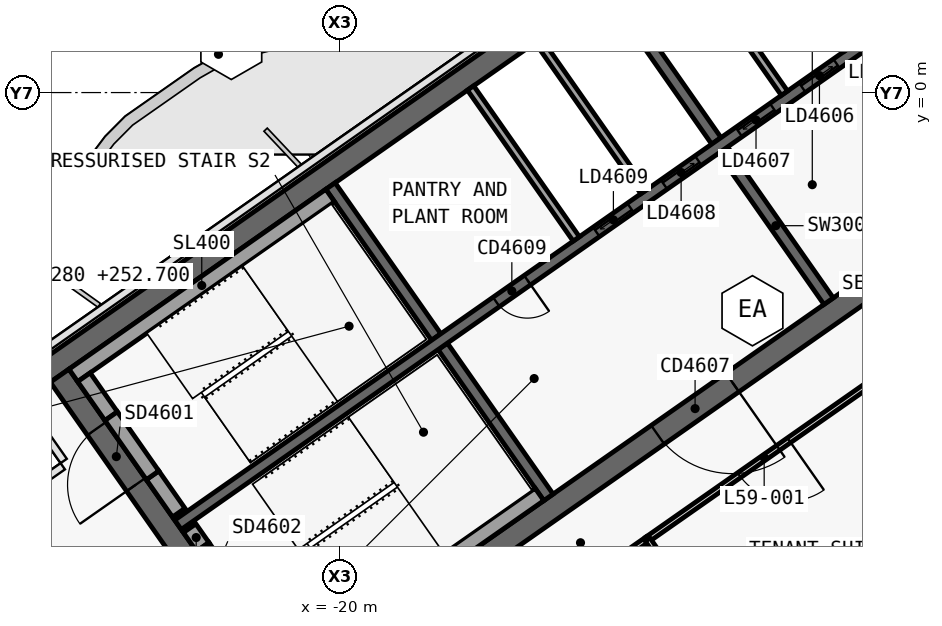
"""IFC4 building model, lengths in metres.
Left out: names, types, materials, properties, quantities, classifications, styles, units other than length and angle.
Written with IfcOpenShell. Run it as: python <this file> out.ifc"""

import sys

from ifc_helpers import new_model, si_unit, direction, frame, frame_2d, origin, place, context, subcontext, project, spatial, polyline, rectangle, outline, extrude, element, fill, save


model = new_model("IFC4")
c1 = context("Model", 3, precision=1e-05, world=origin(), true_north=direction((0.0, 1.0)))
c2 = subcontext(c1, "Body", "Model", "MODEL_VIEW")
j1 = project(units=[si_unit("LENGTHUNIT", "METRE"), si_unit("PLANEANGLEUNIT", "RADIAN")], contexts=[c1])
p1 = place(None, origin())
s1 = spatial("IfcSite", under=j1, at=p1, CompositionType="ELEMENT")
p2 = place(p1, origin())
s2 = spatial("IfcBuilding", under=s1, at=p2, CompositionType="ELEMENT")
p3 = place(p2, frame((0.0, 0.0, 252.7)))
s3 = spatial("IfcBuildingStorey", under=s2, at=p3, CompositionType="ELEMENT", Elevation=252.7)
p4 = place(p3, frame((-0.028, 12.066, 0.0), z_axis=(0.0, 0.0, 1.0), x_axis=(-0.819151382952, -0.573577380837, 0.0)))
e1 = element("IfcWall", 1, at=p4, inside=s3, PredefinedType="SHEAR", context=c2, shape_type="SweptSolid", body=[
    extrude(outline(polyline([(33.898, 0.3), (0.42, 0.3), (0.0, -0.3), (33.898, -0.3), (33.898, 0.3)])), origin(), (0.0, 0.0, 1.0), 3.9),
])
p5 = place(p3, frame((-0.028, -0.874, 0.0), z_axis=(0.0, 0.0, 1.0), x_axis=(-0.819150035022, -0.573579305871, 0.0)))
e2 = element("IfcWall", 2, at=p5, inside=s3, PredefinedType="SHEAR", context=c2, shape_type="SweptSolid", body=[
    extrude(outline(polyline([(26.476, 0.3), (0.42, 0.3), (0.0, -0.3), (26.476, -0.3), (26.476, 0.3)])), origin(), (0.0, 0.0, 1.0), 3.9),
])
p6 = place(p5, frame((2.976, 0.0, 0.0)))
e3 = element("IfcOpeningElement", 3, at=p6, cuts=e2, PredefinedType="OPENING", context=c2, shape_type="SweptSolid", body=[
    extrude(rectangle(XDim=2.4, YDim=2.1, at=frame_2d((1.2, 1.05))), frame((0.0, 0.31, 0.0), z_axis=(0.0, -1.0, 0.0), x_axis=(1.0, 0.0, 0.0)), (0.0, 0.0, 1.0), 0.62),
])
p7 = place(p5, frame((11.776, 0.0, 0.0)))
e4 = element("IfcOpeningElement", 4, at=p7, cuts=e2, PredefinedType="OPENING", context=c2, shape_type="SweptSolid", body=[
    extrude(rectangle(XDim=2.4, YDim=2.1, at=frame_2d((1.2, 1.05))), frame((0.0, 0.31, 0.0), z_axis=(0.0, -1.0, 0.0), x_axis=(1.0, 0.0, 0.0)), (0.0, 0.0, 1.0), 0.62),
])
p8 = place(p3, frame((-21.642, -15.642, 0.0), z_axis=(0.0, 0.0, 1.0), x_axis=(-0.573586866468, 0.819144740944, 0.0)))
e5 = element("IfcWall", 5, at=p8, inside=s3, PredefinedType="SHEAR", context=c2, shape_type="SweptSolid", body=[
    extrude(outline(polyline([(0.0, 0.3), (0.0, -0.3), (10.0, -0.3), (10.0, 0.3), (0.0, 0.3)])), origin(), (0.0, 0.0, 1.0), 3.9),
])
p9 = place(p8, frame((6.5, 0.0, 0.0)))
e6 = element("IfcOpeningElement", 6, at=p9, cuts=e5, PredefinedType="OPENING", context=c2, shape_type="SweptSolid", body=[
    extrude(rectangle(XDim=1.8, YDim=2.1, at=frame_2d((0.9, 1.05))), frame((0.0, 0.31, 0.0), z_axis=(0.0, -1.0, 0.0), x_axis=(1.0, 0.0, 0.0)), (0.0, 0.0, 1.0), 0.62),
])
p10 = place(p8, frame((2.3, 0.0, 0.0)))
e7 = element("IfcOpeningElement", 7, at=p10, cuts=e5, PredefinedType="OPENING", context=c2, shape_type="SweptSolid", body=[
    extrude(rectangle(XDim=1.8, YDim=2.1, at=frame_2d((0.9, 1.05))), frame((0.0, 0.31, 0.0), z_axis=(0.0, -1.0, 0.0), x_axis=(1.0, 0.0, 0.0)), (0.0, 0.0, 1.0), 0.62),
])
p11 = place(p3, frame((-7.143, -5.49, 0.0), z_axis=(0.0, 0.0, 1.0), x_axis=(-0.573617744349, 0.819123118565, 0.0)))
e8 = element("IfcWall", 8, at=p11, inside=s3, PredefinedType="SHEAR", context=c2, shape_type="SweptSolid", body=[
    extrude(outline(polyline([(4.85, 0.15), (0.0, 0.15), (0.0, -0.15), (4.85, -0.15), (4.85, 0.15)])), origin(), (0.0, 0.0, 1.0), 3.9),
])
p12 = place(p3, frame((-10.097, -1.271, 0.0), z_axis=(0.0, 0.0, 1.0), x_axis=(-0.573560315113, 0.819163332265, 0.0)))
e9 = element("IfcWall", 9, at=p12, inside=s3, PredefinedType="SHEAR", context=c2, shape_type="SweptSolid", body=[
    extrude(outline(polyline([(4.85, -0.15), (4.85, 0.15), (0.0, 0.15), (0.0, -0.15), (4.85, -0.15)])), origin(), (0.0, 0.0, 1.0), 3.9),
])
p13 = place(p3, frame((-14.515, -10.652, 0.0), z_axis=(0.0, 0.0, 1.0), x_axis=(-0.573560315113, 0.819163332265, 0.0)))
e10 = element("IfcWall", 10, at=p13, inside=s3, PredefinedType="SHEAR", context=c2, shape_type="SweptSolid", body=[
    extrude(outline(polyline([(4.85, 0.15), (0.0, 0.15), (0.0, -0.15), (4.85, -0.15), (4.85, 0.15)])), origin(), (0.0, 0.0, 1.0), 3.9),
])
p14 = place(p3, frame((-17.469, -6.433, 0.0), z_axis=(0.0, 0.0, 1.0), x_axis=(-0.573594092424, 0.81913968109, 0.0)))
e11 = element("IfcWall", 11, at=p14, inside=s3, PredefinedType="SHEAR", context=c2, shape_type="SweptSolid", body=[
    extrude(outline(polyline([(4.85, -0.15), (4.85, 0.15), (0.0, 0.15), (0.0, -0.15), (4.85, -0.15)])), origin(), (0.0, 0.0, 1.0), 3.9),
])
p15 = place(p3, frame((-2.638, 3.768, 0.0), z_axis=(0.0, 0.0, 1.0), x_axis=(-0.819155014212, -0.573572194837, 0.0)))
e12 = element("IfcWall", 12, at=p15, inside=s3, PredefinedType="SHEAR", context=c2, shape_type="SweptSolid", body=[
    extrude(outline(polyline([(26.4, 0.15), (0.0, 0.15), (0.0, -0.15), (26.4, -0.15), (26.4, 0.15)])), origin(), (0.0, 0.0, 1.0), 3.9),
])
p16 = place(p15, frame((1.169, 0.0, 0.0)))
e13 = element("IfcOpeningElement", 13, at=p16, cuts=e12, PredefinedType="OPENING", context=c2, shape_type="SweptSolid", body=[
    extrude(rectangle(XDim=1.1, YDim=2.1, at=frame_2d((0.55, 1.05))), frame((0.0, 0.16, 0.0), z_axis=(0.0, -1.0, 0.0), x_axis=(1.0, 0.0, 0.0)), (0.0, 0.0, 1.0), 0.32),
])
p17 = place(p15, frame((3.206, 0.0, 0.0)))
e14 = element("IfcOpeningElement", 14, at=p17, cuts=e12, PredefinedType="OPENING", context=c2, shape_type="SweptSolid", body=[
    extrude(rectangle(XDim=1.1, YDim=2.1, at=frame_2d((0.55, 1.05))), frame((0.0, 0.16, 0.0), z_axis=(0.0, -1.0, 0.0), x_axis=(1.0, 0.0, 0.0)), (0.0, 0.0, 1.0), 0.32),
])
p18 = place(p15, frame((5.244, 0.0, 0.0)))
e15 = element("IfcOpeningElement", 15, at=p18, cuts=e12, PredefinedType="OPENING", context=c2, shape_type="SweptSolid", body=[
    extrude(rectangle(XDim=1.1, YDim=2.1, at=frame_2d((0.55, 1.05))), frame((0.0, 0.16, 0.0), z_axis=(0.0, -1.0, 0.0), x_axis=(1.0, 0.0, 0.0)), (0.0, 0.0, 1.0), 0.32),
])
p19 = place(p15, frame((7.281, 0.0, 0.0)))
e16 = element("IfcOpeningElement", 16, at=p19, cuts=e12, PredefinedType="OPENING", context=c2, shape_type="SweptSolid", body=[
    extrude(rectangle(XDim=1.1, YDim=2.1, at=frame_2d((0.55, 1.05))), frame((0.0, 0.16, 0.0), z_axis=(0.0, -1.0, 0.0), x_axis=(1.0, 0.0, 0.0)), (0.0, 0.0, 1.0), 0.32),
])
p20 = place(p15, frame((9.688, 0.0, 0.0)))
e17 = element("IfcOpeningElement", 17, at=p20, cuts=e12, PredefinedType="OPENING", context=c2, shape_type="SweptSolid", body=[
    extrude(rectangle(XDim=1.1, YDim=2.1, at=frame_2d((0.55, 1.05))), frame((0.0, 0.16, 0.0), z_axis=(0.0, -1.0, 0.0), x_axis=(1.0, 0.0, 0.0)), (0.0, 0.0, 1.0), 0.32),
])
p21 = place(p15, frame((11.863, 0.0, 0.0)))
e18 = element("IfcOpeningElement", 18, at=p21, cuts=e12, PredefinedType="OPENING", context=c2, shape_type="SweptSolid", body=[
    extrude(rectangle(XDim=1.1, YDim=2.1, at=frame_2d((0.55, 1.05))), frame((0.0, 0.16, 0.0), z_axis=(0.0, -1.0, 0.0), x_axis=(1.0, 0.0, 0.0)), (0.0, 0.0, 1.0), 0.32),
])
p22 = place(p15, frame((15.175, 0.0, 0.0)))
e19 = element("IfcOpeningElement", 19, at=p22, cuts=e12, PredefinedType="OPENING", context=c2, shape_type="SweptSolid", body=[
    extrude(rectangle(XDim=1.0, YDim=2.1, at=frame_2d((0.5, 1.05))), frame((0.0, 0.16, 0.0), z_axis=(0.0, -1.0, 0.0), x_axis=(1.0, 0.0, 0.0)), (0.0, 0.0, 1.0), 0.32),
])
p23 = place(p3, frame((-8.305, -0.017, 0.0), z_axis=(0.0, 0.0, 1.0), x_axis=(-0.573594092424, 0.81913968109, 0.0)))
e20 = element("IfcWall", 20, at=p23, inside=s3, PredefinedType="SOLIDWALL", context=c2, shape_type="SweptSolid", body=[
    extrude(rectangle(XDim=4.85, YDim=0.2, at=frame_2d((2.425, 0.0))), origin(), (0.0, 0.0, 1.0), 3.9),
])
p24 = place(p3, frame((-12.001, -2.605, 0.0), z_axis=(0.0, 0.0, 1.0), x_axis=(-0.573560315113, 0.819163332265, 0.0)))
e21 = element("IfcWall", 21, at=p24, inside=s3, PredefinedType="SOLIDWALL", context=c2, shape_type="SweptSolid", body=[
    extrude(rectangle(XDim=4.85, YDim=0.2, at=frame_2d((2.425, 0.0))), origin(), (0.0, 0.0, 1.0), 3.9),
])
p25 = place(p3, frame((-13.783, -3.852, 0.0), z_axis=(0.0, 0.0, 1.0), x_axis=(-0.573594092424, 0.81913968109, 0.0)))
e22 = element("IfcWall", 22, at=p25, inside=s3, PredefinedType="SOLIDWALL", context=c2, shape_type="SweptSolid", body=[
    extrude(rectangle(XDim=4.85, YDim=0.2, at=frame_2d((2.425, 0.0))), origin(), (0.0, 0.0, 1.0), 3.9),
])
p26 = place(p3, frame((-20.259, -2.71, 0.0), z_axis=(0.0, 0.0, 1.0), x_axis=(-0.81914849389, -0.573581506813, 0.0)))
e23 = element("IfcWall", 23, at=p26, inside=s3, PredefinedType="SOLIDWALL", context=c2, shape_type="SweptSolid", body=[
    extrude(rectangle(XDim=8.25, YDim=0.4, at=frame_2d((4.125, 0.0))), origin(), (0.0, 0.0, 1.0), 3.62),
])
p27 = place(p3, frame((-24.244, -11.055, 0.0), z_axis=(0.0, 0.0, 1.0), x_axis=(-0.573571582932, 0.819155442668, 0.0)))
e24 = element("IfcWall", 24, at=p27, inside=s3, PredefinedType="SOLIDWALL", context=c2, shape_type="SweptSolid", body=[
    extrude(rectangle(XDim=1.2, YDim=0.4, at=frame_2d((0.6, 0.0))), origin(), (0.0, 0.0, 1.0), 3.62),
])
p28 = place(p3, frame((-26.022, -8.515, 0.0), z_axis=(0.0, 0.0, 1.0), x_axis=(-0.573619628835, 0.819121798889, 0.0)))
e25 = element("IfcWall", 25, at=p28, inside=s3, PredefinedType="SOLIDWALL", context=c2, shape_type="SweptSolid", body=[
    extrude(rectangle(XDim=1.25, YDim=0.4, at=frame_2d((0.625, 0.0))), origin(), (0.0, 0.0, 1.0), 3.62),
])
p29 = place(p3, frame((-24.932, -10.072, 2.15), z_axis=(0.0, 0.0, 1.0), x_axis=(-0.573591692345, 0.819141361715, 0.0)))
e26 = element("IfcWall", 26, at=p29, inside=s3, PredefinedType="SOLIDWALL", context=c2, shape_type="SweptSolid", body=[
    extrude(rectangle(XDim=1.9, YDim=0.4, at=frame_2d((0.95, 0.0))), origin(), (0.0, 0.0, 1.0), 1.47),
])
p30 = place(p3, frame((-14.753, -10.574, 0.0), z_axis=(0.0, 0.0, 1.0), x_axis=(-0.819158229677, -0.573567602601, 0.0)))
e27 = element("IfcWall", 27, at=p30, inside=s3, PredefinedType="SOLIDWALL", context=c2, shape_type="SweptSolid", body=[
    extrude(rectangle(XDim=8.25, YDim=0.4, at=frame_2d((4.125, 0.0))), origin(), (0.0, 0.0, 1.0), 3.62),
])
p31 = place(p3, frame((-23.613, -11.956, 0.0), z_axis=(0.0, 0.0, 1.0), x_axis=(-0.573435029941, 0.819251039936, 0.0)))
e28 = element("IfcWall", 28, at=p31, inside=s3, PredefinedType="SOLIDWALL", context=c2, shape_type="SweptSolid", body=[
    extrude(rectangle(XDim=0.6, YDim=0.4, at=frame_2d((0.3, 0.0))), origin(), (0.0, 0.0, 1.0), 3.62),
])
p32 = place(p3, frame((-22.523, -13.512, 2.15), z_axis=(0.0, 0.0, 1.0), x_axis=(-0.573591692345, 0.819141361715, 0.0)))
e29 = element("IfcWall", 29, at=p32, inside=s3, PredefinedType="SOLIDWALL", context=c2, shape_type="SweptSolid", body=[
    extrude(rectangle(XDim=1.9, YDim=0.4, at=frame_2d((0.95, 0.0))), origin(), (0.0, 0.0, 1.0), 1.47),
])
p33 = place(p3, frame((-5.766, -7.456, 0.0), z_axis=(0.0, 0.0, 1.0), x_axis=(-0.819150881364, -0.573578097177, 0.0)))
e30 = element("IfcWall", 30, at=p33, inside=s3, PredefinedType="PARTITIONING", context=c2, shape_type="SweptSolid", body=[
    extrude(rectangle(XDim=7.502, YDim=0.15, at=frame_2d((3.751, 0.0))), origin(), (0.0, 0.0, 1.0), 3.05),
])
p34 = place(p33, frame((2.951, 0.0, 0.0)))
e31 = element("IfcOpeningElement", 31, at=p34, cuts=e30, PredefinedType="OPENING", context=c2, shape_type="SweptSolid", body=[
    extrude(rectangle(XDim=1.6, YDim=2.1, at=frame_2d((0.8, 1.05))), frame((0.0, 0.085, 0.0), z_axis=(0.0, -1.0, 0.0), x_axis=(1.0, 0.0, 0.0)), (0.0, 0.0, 1.0), 0.17),
])
p35 = place(p3, frame((-11.908, -11.757, 0.0), z_axis=(0.0, 0.0, 1.0), x_axis=(-0.819156568366, -0.573569975245, 0.0)))
e32 = element("IfcWall", 32, at=p35, inside=s3, PredefinedType="PARTITIONING", context=c2, shape_type="SweptSolid", body=[
    extrude(rectangle(XDim=10.504, YDim=0.15, at=frame_2d((5.252, 0.0))), origin(), (0.0, 0.0, 1.0), 3.05),
])
p36 = place(p35, frame((4.452, 0.0, 0.0)))
e33 = element("IfcOpeningElement", 33, at=p36, cuts=e32, PredefinedType="OPENING", context=c2, shape_type="SweptSolid", body=[
    extrude(rectangle(XDim=1.6, YDim=2.1, at=frame_2d((0.8, 1.05))), frame((0.0, 0.085, 0.0), z_axis=(0.0, -1.0, 0.0), x_axis=(1.0, 0.0, 0.0)), (0.0, 0.0, 1.0), 0.17),
])
p37 = place(p3, frame((-7.608, -17.901, 0.0), z_axis=(0.0, 0.0, 1.0), x_axis=(-0.573560650686, 0.819163097304, 0.0)))
e34 = element("IfcWall", 34, at=p37, inside=s3, PredefinedType="PARTITIONING", context=c2, shape_type="SweptSolid", body=[
    extrude(rectangle(XDim=7.5, YDim=0.15, at=frame_2d((3.75, 0.0))), origin(), (0.0, 0.0, 1.0), 3.0),
])
p38 = place(p18, origin())
e35 = element("IfcDoor", 35, at=p38, inside=s3, OperationType="SLIDING_TO_LEFT", PredefinedType="DOOR", context=c2, shape_type="SweptSolid", body=[
    extrude(rectangle(XDim=1.1, YDim=2.1, at=frame_2d((0.55, 1.05))), frame((0.0, 0.025, 0.0), z_axis=(0.0, -1.0, 0.0), x_axis=(1.0, 0.0, 0.0)), (0.0, 0.0, 1.0), 0.05),
])
fill(e15, e35)
p39 = place(p19, origin())
e36 = element("IfcDoor", 36, at=p39, inside=s3, OperationType="SLIDING_TO_RIGHT", PredefinedType="DOOR", context=c2, shape_type="SweptSolid", body=[
    extrude(rectangle(XDim=1.1, YDim=2.1, at=frame_2d((0.55, 1.05))), frame((0.0, 0.025, 0.0), z_axis=(0.0, -1.0, 0.0), x_axis=(1.0, 0.0, 0.0)), (0.0, 0.0, 1.0), 0.05),
])
fill(e16, e36)
p40 = place(p20, origin())
e37 = element("IfcDoor", 37, at=p40, inside=s3, OperationType="SLIDING_TO_LEFT", PredefinedType="DOOR", context=c2, shape_type="SweptSolid", body=[
    extrude(rectangle(XDim=1.1, YDim=2.1, at=frame_2d((0.55, 1.05))), frame((0.0, 0.025, 0.0), z_axis=(0.0, -1.0, 0.0), x_axis=(1.0, 0.0, 0.0)), (0.0, 0.0, 1.0), 0.05),
])
fill(e17, e37)
p41 = place(p21, origin())
e38 = element("IfcDoor", 38, at=p41, inside=s3, OperationType="SLIDING_TO_RIGHT", PredefinedType="DOOR", context=c2, shape_type="SweptSolid", body=[
    extrude(rectangle(XDim=1.1, YDim=2.1, at=frame_2d((0.55, 1.05))), frame((0.0, 0.025, 0.0), z_axis=(0.0, -1.0, 0.0), x_axis=(1.0, 0.0, 0.0)), (0.0, 0.0, 1.0), 0.05),
])
fill(e18, e38)
p42 = place(p22, origin())
e39 = element("IfcDoor", 39, at=p42, inside=s3, OperationType="SINGLE_SWING_RIGHT", PredefinedType="DOOR", context=c2, shape_type="SweptSolid", body=[
    extrude(rectangle(XDim=1.0, YDim=2.1, at=frame_2d((0.5, 1.05))), frame((0.0, 0.025, 0.0), z_axis=(0.0, -1.0, 0.0), x_axis=(1.0, 0.0, 0.0)), (0.0, 0.0, 1.0), 0.05),
])
fill(e19, e39)
p43 = place(p7, origin())
e40 = element("IfcDoor", 40, at=p43, inside=s3, OperationType="DOUBLE_DOOR_SINGLE_SWING", PredefinedType="DOOR", context=c2, shape_type="SweptSolid", body=[
    extrude(rectangle(XDim=2.4, YDim=2.1, at=frame_2d((1.2, 1.05))), frame((0.0, 0.025, 0.0), z_axis=(0.0, -1.0, 0.0), x_axis=(1.0, 0.0, 0.0)), (0.0, 0.0, 1.0), 0.05),
])
fill(e4, e40)
p44 = place(p9, origin())
e41 = element("IfcDoor", 41, at=p44, inside=s3, OperationType="DOUBLE_DOOR_SINGLE_SWING", PredefinedType="DOOR", context=c2, shape_type="SweptSolid", body=[
    extrude(rectangle(XDim=1.8, YDim=2.1, at=frame_2d((0.9, 1.05))), frame((0.0, 0.025, 0.0), z_axis=(0.0, -1.0, 0.0), x_axis=(1.0, 0.0, 0.0)), (0.0, 0.0, 1.0), 0.05),
])
fill(e6, e41)
p45 = place(p34, origin())
e42 = element("IfcDoor", 42, at=p45, inside=s3, OperationType="DOUBLE_DOOR_SINGLE_SWING", PredefinedType="DOOR", context=c2, shape_type="SweptSolid", body=[
    extrude(rectangle(XDim=1.6, YDim=2.1, at=frame_2d((0.8, 1.05))), frame((0.0, 0.025, 0.0), z_axis=(0.0, -1.0, 0.0), x_axis=(1.0, 0.0, 0.0)), (0.0, 0.0, 1.0), 0.05),
])
fill(e31, e42)
save(model, sys.argv[1])
